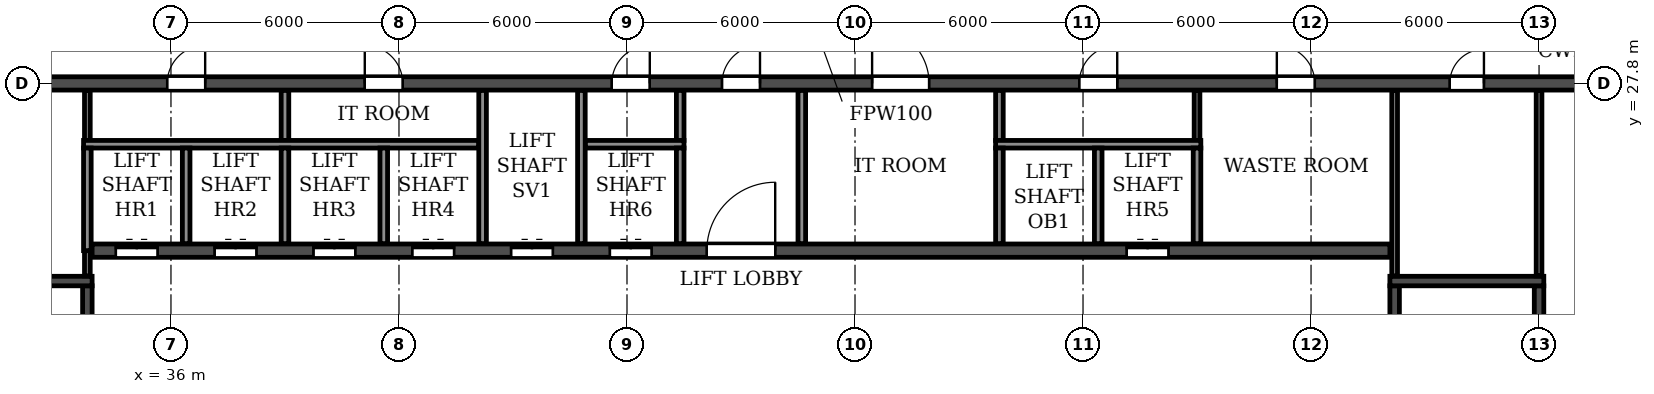
"""IFC4 building model, lengths in metres.
Left out: names, types, materials, properties, quantities, classifications, styles, units other than length and angle.
Written with IfcOpenShell. Run it as: python <this file> out.ifc"""

import sys

from ifc_helpers import new_model, si_unit, direction, frame, frame_2d, origin, place, context, subcontext, project, spatial, rectangle, extrude, element, fill, save


model = new_model("IFC4")
c1 = context("Model", 3, precision=1e-05, world=origin(), true_north=direction((0.0, 1.0)))
c2 = subcontext(c1, "Body", "Model", "MODEL_VIEW")
j1 = project(units=[si_unit("LENGTHUNIT", "METRE"), si_unit("PLANEANGLEUNIT", "RADIAN")], contexts=[c1])
p1 = place(None, origin())
s1 = spatial("IfcSite", under=j1, at=p1, CompositionType="ELEMENT")
p2 = place(p1, origin())
s2 = spatial("IfcBuilding", under=s1, at=p2, CompositionType="ELEMENT")
p3 = place(p2, frame((0.0, 0.0, 221.4)))
s3 = spatial("IfcBuildingStorey", under=s2, at=p3, CompositionType="ELEMENT", Elevation=221.4)
p4 = place(p3, frame((18.2, 27.8, 0.0), z_axis=(0.0, 0.0, 1.0), x_axis=(1.0, 0.0, 0.0)))
e1 = element("IfcWall", 1, at=p4, inside=s3, PredefinedType="SOLIDWALL", context=c2, shape_type="SweptSolid", body=[
    extrude(rectangle(XDim=65.6, YDim=0.35, at=frame_2d((32.8, 0.0))), origin(), (0.0, 0.0, 1.0), 3.08),
])
p5 = place(p4, frame((0.7, 0.0, 0.0)))
e2 = element("IfcOpeningElement", 2, at=p5, cuts=e1, PredefinedType="OPENING", context=c2, shape_type="SweptSolid", body=[
    extrude(rectangle(XDim=1.0, YDim=2.1, at=frame_2d((0.5, 1.05))), frame((0.0, 0.185, 0.0), z_axis=(0.0, -1.0, 0.0), x_axis=(1.0, 0.0, 0.0)), (0.0, 0.0, 1.0), 0.37),
])
p6 = place(p4, frame((4.05, 0.0, 0.0)))
e3 = element("IfcOpeningElement", 3, at=p6, cuts=e1, PredefinedType="OPENING", context=c2, shape_type="SweptSolid", body=[
    extrude(rectangle(XDim=0.9, YDim=2.1, at=frame_2d((0.45, 1.05))), frame((0.0, 0.185, 0.0), z_axis=(0.0, -1.0, 0.0), x_axis=(1.0, 0.0, 0.0)), (0.0, 0.0, 1.0), 0.37),
])
p7 = place(p4, frame((13.25, 0.0, 0.0)))
e4 = element("IfcOpeningElement", 4, at=p7, cuts=e1, PredefinedType="OPENING", context=c2, shape_type="SweptSolid", body=[
    extrude(rectangle(XDim=0.9, YDim=2.1, at=frame_2d((0.45, 1.05))), frame((0.0, 0.185, 0.0), z_axis=(0.0, -1.0, 0.0), x_axis=(1.0, 0.0, 0.0)), (0.0, 0.0, 1.0), 0.37),
])
p8 = place(p4, frame((17.7, 0.0, 0.0)))
e5 = element("IfcOpeningElement", 5, at=p8, cuts=e1, PredefinedType="OPENING", context=c2, shape_type="SweptSolid", body=[
    extrude(rectangle(XDim=1.0, YDim=2.1, at=frame_2d((0.5, 1.05))), frame((0.0, 0.185, 0.0), z_axis=(0.0, -1.0, 0.0), x_axis=(1.0, 0.0, 0.0)), (0.0, 0.0, 1.0), 0.37),
])
p9 = place(p4, frame((22.9, 0.0, 0.0)))
e6 = element("IfcOpeningElement", 6, at=p9, cuts=e1, PredefinedType="OPENING", context=c2, shape_type="SweptSolid", body=[
    extrude(rectangle(XDim=1.0, YDim=2.1, at=frame_2d((0.5, 1.05))), frame((0.0, 0.185, 0.0), z_axis=(0.0, -1.0, 0.0), x_axis=(1.0, 0.0, 0.0)), (0.0, 0.0, 1.0), 0.37),
])
p10 = place(p4, frame((29.4, 0.0, 0.0)))
e7 = element("IfcOpeningElement", 7, at=p10, cuts=e1, PredefinedType="OPENING", context=c2, shape_type="SweptSolid", body=[
    extrude(rectangle(XDim=1.0, YDim=2.1, at=frame_2d((0.5, 1.05))), frame((0.0, 0.185, 0.0), z_axis=(0.0, -1.0, 0.0), x_axis=(1.0, 0.0, 0.0)), (0.0, 0.0, 1.0), 0.37),
])
p11 = place(p4, frame((32.3, 0.0, 0.0)))
e8 = element("IfcOpeningElement", 8, at=p11, cuts=e1, PredefinedType="OPENING", context=c2, shape_type="SweptSolid", body=[
    extrude(rectangle(XDim=1.0, YDim=2.1, at=frame_2d((0.5, 1.05))), frame((0.0, 0.185, 0.0), z_axis=(0.0, -1.0, 0.0), x_axis=(1.0, 0.0, 0.0)), (0.0, 0.0, 1.0), 0.37),
])
p12 = place(p4, frame((36.25, 0.0, 0.0)))
e9 = element("IfcOpeningElement", 9, at=p12, cuts=e1, PredefinedType="OPENING", context=c2, shape_type="SweptSolid", body=[
    extrude(rectangle(XDim=1.5, YDim=2.1, at=frame_2d((0.75, 1.05))), frame((0.0, 0.185, 0.0), z_axis=(0.0, -1.0, 0.0), x_axis=(1.0, 0.0, 0.0)), (0.0, 0.0, 1.0), 0.37),
])
p13 = place(p4, frame((41.7, 0.0, 0.0)))
e10 = element("IfcOpeningElement", 10, at=p13, cuts=e1, PredefinedType="OPENING", context=c2, shape_type="SweptSolid", body=[
    extrude(rectangle(XDim=1.0, YDim=2.1, at=frame_2d((0.5, 1.05))), frame((0.0, 0.185, 0.0), z_axis=(0.0, -1.0, 0.0), x_axis=(1.0, 0.0, 0.0)), (0.0, 0.0, 1.0), 0.37),
])
p14 = place(p4, frame((46.9, 0.0, 0.0)))
e11 = element("IfcOpeningElement", 11, at=p14, cuts=e1, PredefinedType="OPENING", context=c2, shape_type="SweptSolid", body=[
    extrude(rectangle(XDim=1.0, YDim=2.1, at=frame_2d((0.5, 1.05))), frame((0.0, 0.185, 0.0), z_axis=(0.0, -1.0, 0.0), x_axis=(1.0, 0.0, 0.0)), (0.0, 0.0, 1.0), 0.37),
])
p15 = place(p4, frame((51.45, 0.0, 0.0)))
e12 = element("IfcOpeningElement", 12, at=p15, cuts=e1, PredefinedType="OPENING", context=c2, shape_type="SweptSolid", body=[
    extrude(rectangle(XDim=0.9, YDim=2.1, at=frame_2d((0.45, 1.05))), frame((0.0, 0.185, 0.0), z_axis=(0.0, -1.0, 0.0), x_axis=(1.0, 0.0, 0.0)), (0.0, 0.0, 1.0), 0.37),
])
p16 = place(p4, frame((60.65, 0.0, 0.0)))
e13 = element("IfcOpeningElement", 13, at=p16, cuts=e1, PredefinedType="OPENING", context=c2, shape_type="SweptSolid", body=[
    extrude(rectangle(XDim=0.9, YDim=2.1, at=frame_2d((0.45, 1.05))), frame((0.0, 0.185, 0.0), z_axis=(0.0, -1.0, 0.0), x_axis=(1.0, 0.0, 0.0)), (0.0, 0.0, 1.0), 0.37),
])
p17 = place(p4, frame((63.9, 0.0, 0.0)))
e14 = element("IfcOpeningElement", 14, at=p17, cuts=e1, PredefinedType="OPENING", context=c2, shape_type="SweptSolid", body=[
    extrude(rectangle(XDim=1.0, YDim=2.1, at=frame_2d((0.5, 1.05))), frame((0.0, 0.185, 0.0), z_axis=(0.0, -1.0, 0.0), x_axis=(1.0, 0.0, 0.0)), (0.0, 0.0, 1.0), 0.37),
])
p18 = place(p3, frame((33.925, 23.4, 0.0), z_axis=(0.0, 0.0, 1.0), x_axis=(1.0, 0.0, 0.0)))
e15 = element("IfcWall", 15, at=p18, inside=s3, PredefinedType="SOLIDWALL", context=c2, shape_type="SweptSolid", body=[
    extrude(rectangle(XDim=34.15, YDim=0.35, at=frame_2d((17.075, 0.0))), origin(), (0.0, 0.0, 1.0), 3.08),
])
p19 = place(p18, frame((16.175, 0.0, 0.0)))
e16 = element("IfcOpeningElement", 16, at=p19, cuts=e15, PredefinedType="OPENING", context=c2, shape_type="SweptSolid", body=[
    extrude(rectangle(XDim=1.8, YDim=2.1, at=frame_2d((0.9, 1.05))), frame((0.0, 0.185, 0.0), z_axis=(0.0, -1.0, 0.0), x_axis=(1.0, 0.0, 0.0)), (0.0, 0.0, 1.0), 0.37),
])
p20 = place(p18, frame((0.625, 0.0, 0.0)))
e17 = element("IfcOpeningElement", 17, at=p20, cuts=e15, PredefinedType="OPENING", context=c2, shape_type="SweptSolid", body=[
    extrude(rectangle(XDim=1.1, YDim=2.1, at=frame_2d((0.55, 1.05))), frame((0.0, 0.185, 0.0), z_axis=(0.0, -1.0, 0.0), x_axis=(1.0, 0.0, 0.0)), (0.0, 0.0, 1.0), 0.37),
])
p21 = place(p18, frame((3.225, 0.0, 0.0)))
e18 = element("IfcOpeningElement", 18, at=p21, cuts=e15, PredefinedType="OPENING", context=c2, shape_type="SweptSolid", body=[
    extrude(rectangle(XDim=1.1, YDim=2.1, at=frame_2d((0.55, 1.05))), frame((0.0, 0.185, 0.0), z_axis=(0.0, -1.0, 0.0), x_axis=(1.0, 0.0, 0.0)), (0.0, 0.0, 1.0), 0.37),
])
p22 = place(p18, frame((5.825, 0.0, 0.0)))
e19 = element("IfcOpeningElement", 19, at=p22, cuts=e15, PredefinedType="OPENING", context=c2, shape_type="SweptSolid", body=[
    extrude(rectangle(XDim=1.1, YDim=2.1, at=frame_2d((0.55, 1.05))), frame((0.0, 0.185, 0.0), z_axis=(0.0, -1.0, 0.0), x_axis=(1.0, 0.0, 0.0)), (0.0, 0.0, 1.0), 0.37),
])
p23 = place(p18, frame((8.425, 0.0, 0.0)))
e20 = element("IfcOpeningElement", 20, at=p23, cuts=e15, PredefinedType="OPENING", context=c2, shape_type="SweptSolid", body=[
    extrude(rectangle(XDim=1.1, YDim=2.1, at=frame_2d((0.55, 1.05))), frame((0.0, 0.185, 0.0), z_axis=(0.0, -1.0, 0.0), x_axis=(1.0, 0.0, 0.0)), (0.0, 0.0, 1.0), 0.37),
])
p24 = place(p18, frame((11.025, 0.0, 0.0)))
e21 = element("IfcOpeningElement", 21, at=p24, cuts=e15, PredefinedType="OPENING", context=c2, shape_type="SweptSolid", body=[
    extrude(rectangle(XDim=1.1, YDim=2.1, at=frame_2d((0.55, 1.05))), frame((0.0, 0.185, 0.0), z_axis=(0.0, -1.0, 0.0), x_axis=(1.0, 0.0, 0.0)), (0.0, 0.0, 1.0), 0.37),
])
p25 = place(p18, frame((13.625, 0.0, 0.0)))
e22 = element("IfcOpeningElement", 22, at=p25, cuts=e15, PredefinedType="OPENING", context=c2, shape_type="SweptSolid", body=[
    extrude(rectangle(XDim=1.1, YDim=2.1, at=frame_2d((0.55, 1.05))), frame((0.0, 0.185, 0.0), z_axis=(0.0, -1.0, 0.0), x_axis=(1.0, 0.0, 0.0)), (0.0, 0.0, 1.0), 0.37),
])
p26 = place(p18, frame((27.225, 0.0, 0.0)))
e23 = element("IfcOpeningElement", 23, at=p26, cuts=e15, PredefinedType="OPENING", context=c2, shape_type="SweptSolid", body=[
    extrude(rectangle(XDim=1.1, YDim=2.1, at=frame_2d((0.55, 1.05))), frame((0.0, 0.185, 0.0), z_axis=(0.0, -1.0, 0.0), x_axis=(1.0, 0.0, 0.0)), (0.0, 0.0, 1.0), 0.37),
])
p27 = place(p3, frame((33.8, 14.775, 0.0), z_axis=(0.0, 0.0, 1.0), x_axis=(0.0, 1.0, 0.0)))
e24 = element("IfcWall", 24, at=p27, inside=s3, PredefinedType="SOLIDWALL", context=c2, shape_type="SweptSolid", body=[
    extrude(rectangle(XDim=7.7, YDim=0.25, at=frame_2d((3.85, 0.0))), origin(), (0.0, 0.0, 1.0), 3.08),
])
p28 = place(p27, frame((0.525, 0.0, 0.0)))
e25 = element("IfcOpeningElement", 25, at=p28, cuts=e24, PredefinedType="OPENING", context=c2, shape_type="SweptSolid", body=[
    extrude(rectangle(XDim=1.0, YDim=2.1, at=frame_2d((0.5, 1.05))), frame((0.0, 0.135, 0.0), z_axis=(0.0, -1.0, 0.0), x_axis=(1.0, 0.0, 0.0)), (0.0, 0.0, 1.0), 0.27),
])
p29 = place(p3, frame((29.875, 22.6, 0.0), z_axis=(0.0, 0.0, 1.0), x_axis=(1.0, 0.0, 0.0)))
e26 = element("IfcWall", 26, at=p29, inside=s3, PredefinedType="SOLIDWALL", context=c2, shape_type="SweptSolid", body=[
    extrude(rectangle(XDim=4.05, YDim=0.25, at=frame_2d((2.025, 0.0))), origin(), (0.0, 0.0, 1.0), 3.08),
])
p30 = place(p3, frame((68.2, 14.775, 0.0), z_axis=(0.0, 0.0, 1.0), x_axis=(0.0, 1.0, 0.0)))
e27 = element("IfcWall", 27, at=p30, inside=s3, PredefinedType="SOLIDWALL", context=c2, shape_type="SweptSolid", body=[
    extrude(rectangle(XDim=7.7, YDim=0.25, at=frame_2d((3.85, 0.0))), origin(), (0.0, 0.0, 1.0), 3.08),
])
p31 = place(p30, frame((0.525, 0.0, 0.0)))
e28 = element("IfcOpeningElement", 28, at=p31, cuts=e27, PredefinedType="OPENING", context=c2, shape_type="SweptSolid", body=[
    extrude(rectangle(XDim=1.0, YDim=2.1, at=frame_2d((0.5, 1.05))), frame((0.0, 0.135, 0.0), z_axis=(0.0, -1.0, 0.0), x_axis=(1.0, 0.0, 0.0)), (0.0, 0.0, 1.0), 0.27),
])
p32 = place(p3, frame((72.0, 14.775, 0.0), z_axis=(0.0, 0.0, 1.0), x_axis=(0.0, 1.0, 0.0)))
e29 = element("IfcWall", 29, at=p32, inside=s3, PredefinedType="SOLIDWALL", context=c2, shape_type="SweptSolid", body=[
    extrude(rectangle(XDim=7.7, YDim=0.25, at=frame_2d((3.85, 0.0))), origin(), (0.0, 0.0, 1.0), 3.08),
])
p33 = place(p3, frame((68.075, 22.6, 0.0), z_axis=(0.0, 0.0, 1.0), x_axis=(1.0, 0.0, 0.0)))
e30 = element("IfcWall", 30, at=p33, inside=s3, PredefinedType="SOLIDWALL", context=c2, shape_type="SweptSolid", body=[
    extrude(rectangle(XDim=4.05, YDim=0.25, at=frame_2d((2.025, 0.0))), origin(), (0.0, 0.0, 1.0), 3.08),
])
p34 = place(p3, frame((63.0, 26.3, 0.0), z_axis=(0.0, 0.0, 1.0), x_axis=(0.0, 1.0, 0.0)))
e31 = element("IfcWall", 31, at=p34, inside=s3, PredefinedType="PARTITIONING", context=c2, shape_type="SweptSolid", body=[
    extrude(rectangle(XDim=1.315, YDim=0.15, at=frame_2d((0.657, 0.0))), origin(), (0.0, 0.0, 1.0), 3.08),
])
for number, where, z_axis, x_axis in (
    (32, (39.0, 26.3, 0.0), (0.0, 0.0, 1.0), (0.0, 1.0, 0.0)),
    (33, (49.4, 26.3, 0.0), (0.0, 0.0, 1.0), (0.0, 1.0, 0.0)),
):
    element("IfcWall", number, at=place(p3, frame(where, z_axis=z_axis, x_axis=x_axis)), inside=s3, PredefinedType="PARTITIONING", context=c2, shape_type="SweptSolid", body=[
        extrude(rectangle(XDim=1.315, YDim=0.2, at=frame_2d((0.657, 0.0))), origin(), (0.0, 0.0, 1.0), 3.08),
    ])
p35 = place(p3, frame((52.6, 23.585, 0.0), z_axis=(0.0, 0.0, 1.0), x_axis=(0.0, 1.0, 0.0)))
e34 = element("IfcWall", 34, at=p35, inside=s3, PredefinedType="PARTITIONING", context=c2, shape_type="SweptSolid", body=[
    extrude(rectangle(XDim=4.03, YDim=0.2, at=frame_2d((2.015, 0.0))), origin(), (0.0, 0.0, 1.0), 3.08),
])
p36 = place(p3, frame((57.8, 26.3, 0.0), z_axis=(0.0, 0.0, 1.0), x_axis=(0.0, 1.0, 0.0)))
e35 = element("IfcWall", 35, at=p36, inside=s3, PredefinedType="PARTITIONING", context=c2, shape_type="SweptSolid", body=[
    extrude(rectangle(XDim=1.315, YDim=0.2, at=frame_2d((0.657, 0.0))), origin(), (0.0, 0.0, 1.0), 3.08),
])
p37 = place(p3, frame((33.8, 22.735, 0.0), z_axis=(0.0, 0.0, 1.0), x_axis=(0.0, 1.0, 0.0)))
e36 = element("IfcWall", 36, at=p37, inside=s3, PredefinedType="PARTITIONING", context=c2, shape_type="SweptSolid", body=[
    extrude(rectangle(XDim=0.665, YDim=0.15, at=frame_2d((0.333, 0.0))), origin(), (0.0, 0.0, 1.0), 3.08),
])
p38 = place(p3, frame((33.8, 26.3, 0.0), z_axis=(0.0, 0.0, 1.0), x_axis=(0.0, 1.0, 0.0)))
e37 = element("IfcWall", 37, at=p38, inside=s3, PredefinedType="PARTITIONING", context=c2, shape_type="SweptSolid", body=[
    extrude(rectangle(XDim=1.315, YDim=0.15, at=frame_2d((0.657, 0.0))), origin(), (0.0, 0.0, 1.0), 3.08),
])
for number, where, z_axis, x_axis in (
    (38, (68.2, 22.735, 0.0), (0.0, 0.0, 1.0), (0.0, 1.0, 0.0)),
    (39, (72.0, 22.735, 0.0), (0.0, 0.0, 1.0), (0.0, 1.0, 0.0)),
):
    element("IfcWall", number, at=place(p3, frame(where, z_axis=z_axis, x_axis=x_axis)), inside=s3, PredefinedType="PARTITIONING", context=c2, shape_type="SweptSolid", body=[
        extrude(rectangle(XDim=4.88, YDim=0.15, at=frame_2d((2.44, 0.0))), origin(), (0.0, 0.0, 1.0), 3.08),
    ])
p39 = place(p3, frame((33.7, 26.2, 0.0), z_axis=(0.0, 0.0, 1.0), x_axis=(1.0, 0.0, 0.0)))
e40 = element("IfcWall", 40, at=p39, inside=s3, PredefinedType="PARTITIONING", context=c2, shape_type="SweptSolid", body=[
    extrude(rectangle(XDim=10.4, YDim=0.2, at=frame_2d((5.2, 0.0))), origin(), (0.0, 0.0, 1.0), 3.08),
])
p40 = place(p3, frame((46.9, 26.2, 0.0), z_axis=(0.0, 0.0, 1.0), x_axis=(1.0, 0.0, 0.0)))
e41 = element("IfcWall", 41, at=p40, inside=s3, PredefinedType="PARTITIONING", context=c2, shape_type="SweptSolid", body=[
    extrude(rectangle(XDim=2.6, YDim=0.2, at=frame_2d((1.3, 0.0))), origin(), (0.0, 0.0, 1.0), 3.08),
])
p41 = place(p3, frame((57.7, 26.2, 0.0), z_axis=(0.0, 0.0, 1.0), x_axis=(1.0, 0.0, 0.0)))
e42 = element("IfcWall", 42, at=p41, inside=s3, PredefinedType="PARTITIONING", context=c2, shape_type="SweptSolid", body=[
    extrude(rectangle(XDim=5.4, YDim=0.2, at=frame_2d((2.7, 0.0))), origin(), (0.0, 0.0, 1.0), 3.08),
])
p42 = place(p3, frame((33.8, 23.4, 0.0), z_axis=(0.0, 0.0, 1.0), x_axis=(0.0, 1.0, 0.0)))
e43 = element("IfcWall", 43, at=p42, inside=s3, PredefinedType="PARTITIONING", context=c2, shape_type="SweptSolid", body=[
    extrude(rectangle(XDim=2.7, YDim=0.2, at=frame_2d((1.35, 0.0))), origin(), (0.0, 0.0, 1.0), 3.08),
])
for number, where, z_axis, x_axis in (
    (44, (36.4, 23.585, 0.0), (0.0, 0.0, 1.0), (0.0, 1.0, 0.0)),
    (45, (39.0, 23.585, 0.0), (0.0, 0.0, 1.0), (0.0, 1.0, 0.0)),
    (46, (41.6, 23.585, 0.0), (0.0, 0.0, 1.0), (0.0, 1.0, 0.0)),
):
    element("IfcWall", number, at=place(p3, frame(where, z_axis=z_axis, x_axis=x_axis)), inside=s3, PredefinedType="PARTITIONING", context=c2, shape_type="SweptSolid", body=[
        extrude(rectangle(XDim=2.515, YDim=0.2, at=frame_2d((1.258, 0.0))), origin(), (0.0, 0.0, 1.0), 3.08),
    ])
for number, where, z_axis, x_axis in (
    (47, (44.2, 23.585, 0.0), (0.0, 0.0, 1.0), (0.0, 1.0, 0.0)),
    (48, (46.8, 23.585, 0.0), (0.0, 0.0, 1.0), (0.0, 1.0, 0.0)),
):
    element("IfcWall", number, at=place(p3, frame(where, z_axis=z_axis, x_axis=x_axis)), inside=s3, PredefinedType="PARTITIONING", context=c2, shape_type="SweptSolid", body=[
        extrude(rectangle(XDim=4.03, YDim=0.2, at=frame_2d((2.015, 0.0))), origin(), (0.0, 0.0, 1.0), 3.08),
    ])
for number, where, z_axis, x_axis in (
    (49, (49.4, 23.585, 0.0), (0.0, 0.0, 1.0), (0.0, 1.0, 0.0)),
    (50, (57.8, 23.585, 0.0), (0.0, 0.0, 1.0), (0.0, 1.0, 0.0)),
    (51, (60.4, 23.585, 0.0), (0.0, 0.0, 1.0), (0.0, 1.0, 0.0)),
    (52, (63.0, 23.585, 0.0), (0.0, 0.0, 1.0), (0.0, 1.0, 0.0)),
):
    element("IfcWall", number, at=place(p3, frame(where, z_axis=z_axis, x_axis=x_axis)), inside=s3, PredefinedType="PARTITIONING", context=c2, shape_type="SweptSolid", body=[
        extrude(rectangle(XDim=2.515, YDim=0.2, at=frame_2d((1.258, 0.0))), origin(), (0.0, 0.0, 1.0), 3.08),
    ])
p43 = place(p8, origin())
e53 = element("IfcDoor", 53, at=p43, inside=s3, OperationType="SINGLE_SWING_RIGHT", PredefinedType="DOOR", context=c2, shape_type="SweptSolid", body=[
    extrude(rectangle(XDim=1.0, YDim=2.1, at=frame_2d((0.5, 1.05))), frame((0.0, 0.025, 0.0), z_axis=(0.0, -1.0, 0.0), x_axis=(1.0, 0.0, 0.0)), (0.0, 0.0, 1.0), 0.05),
])
fill(e5, e53)
p44 = place(p9, origin())
e54 = element("IfcDoor", 54, at=p44, inside=s3, OperationType="SINGLE_SWING_LEFT", PredefinedType="DOOR", context=c2, shape_type="SweptSolid", body=[
    extrude(rectangle(XDim=1.0, YDim=2.1, at=frame_2d((0.5, 1.05))), frame((0.0, 0.025, 0.0), z_axis=(0.0, -1.0, 0.0), x_axis=(1.0, 0.0, 0.0)), (0.0, 0.0, 1.0), 0.05),
])
fill(e6, e54)
p45 = place(p10, origin())
e55 = element("IfcDoor", 55, at=p45, inside=s3, OperationType="SINGLE_SWING_RIGHT", PredefinedType="DOOR", context=c2, shape_type="SweptSolid", body=[
    extrude(rectangle(XDim=1.0, YDim=2.1, at=frame_2d((0.5, 1.05))), frame((0.0, 0.025, 0.0), z_axis=(0.0, -1.0, 0.0), x_axis=(1.0, 0.0, 0.0)), (0.0, 0.0, 1.0), 0.05),
])
fill(e7, e55)
p46 = place(p11, origin())
e56 = element("IfcDoor", 56, at=p46, inside=s3, OperationType="SINGLE_SWING_RIGHT", PredefinedType="DOOR", context=c2, shape_type="SweptSolid", body=[
    extrude(rectangle(XDim=1.0, YDim=2.1, at=frame_2d((0.5, 1.05))), frame((0.0, 0.025, 0.0), z_axis=(0.0, -1.0, 0.0), x_axis=(1.0, 0.0, 0.0)), (0.0, 0.0, 1.0), 0.05),
])
fill(e8, e56)
p47 = place(p12, origin())
e57 = element("IfcDoor", 57, at=p47, inside=s3, OperationType="DOUBLE_DOOR_SINGLE_SWING", PredefinedType="DOOR", context=c2, shape_type="SweptSolid", body=[
    extrude(rectangle(XDim=1.5, YDim=2.1, at=frame_2d((0.75, 1.05))), frame((0.0, 0.025, 0.0), z_axis=(0.0, -1.0, 0.0), x_axis=(1.0, 0.0, 0.0)), (0.0, 0.0, 1.0), 0.05),
])
fill(e9, e57)
p48 = place(p13, origin())
e58 = element("IfcDoor", 58, at=p48, inside=s3, OperationType="SINGLE_SWING_RIGHT", PredefinedType="DOOR", context=c2, shape_type="SweptSolid", body=[
    extrude(rectangle(XDim=1.0, YDim=2.1, at=frame_2d((0.5, 1.05))), frame((0.0, 0.025, 0.0), z_axis=(0.0, -1.0, 0.0), x_axis=(1.0, 0.0, 0.0)), (0.0, 0.0, 1.0), 0.05),
])
fill(e10, e58)
p49 = place(p14, origin())
e59 = element("IfcDoor", 59, at=p49, inside=s3, OperationType="SINGLE_SWING_LEFT", PredefinedType="DOOR", context=c2, shape_type="SweptSolid", body=[
    extrude(rectangle(XDim=1.0, YDim=2.1, at=frame_2d((0.5, 1.05))), frame((0.0, 0.025, 0.0), z_axis=(0.0, -1.0, 0.0), x_axis=(1.0, 0.0, 0.0)), (0.0, 0.0, 1.0), 0.05),
])
fill(e11, e59)
p50 = place(p15, origin())
e60 = element("IfcDoor", 60, at=p50, inside=s3, OperationType="SINGLE_SWING_RIGHT", PredefinedType="DOOR", context=c2, shape_type="SweptSolid", body=[
    extrude(rectangle(XDim=0.9, YDim=2.1, at=frame_2d((0.45, 1.05))), frame((0.0, 0.025, 0.0), z_axis=(0.0, -1.0, 0.0), x_axis=(1.0, 0.0, 0.0)), (0.0, 0.0, 1.0), 0.05),
])
fill(e12, e60)
p51 = place(p19, origin())
e61 = element("IfcDoor", 61, at=p51, inside=s3, OperationType="DOUBLE_DOOR_SINGLE_SWING", PredefinedType="DOOR", context=c2, shape_type="SweptSolid", body=[
    extrude(rectangle(XDim=1.8, YDim=2.1, at=frame_2d((0.9, 1.05))), frame((0.0, 0.025, 0.0), z_axis=(0.0, -1.0, 0.0), x_axis=(1.0, 0.0, 0.0)), (0.0, 0.0, 1.0), 0.05),
])
fill(e16, e61)
p52 = place(p20, origin())
e62 = element("IfcDoor", 62, at=p52, inside=s3, OperationType="DOUBLE_DOOR_SLIDING", PredefinedType="DOOR", context=c2, shape_type="SweptSolid", body=[
    extrude(rectangle(XDim=1.1, YDim=2.1, at=frame_2d((0.55, 1.05))), frame((0.0, 0.025, 0.0), z_axis=(0.0, -1.0, 0.0), x_axis=(1.0, 0.0, 0.0)), (0.0, 0.0, 1.0), 0.05),
])
fill(e17, e62)
p53 = place(p21, origin())
e63 = element("IfcDoor", 63, at=p53, inside=s3, OperationType="DOUBLE_DOOR_SLIDING", PredefinedType="DOOR", context=c2, shape_type="SweptSolid", body=[
    extrude(rectangle(XDim=1.1, YDim=2.1, at=frame_2d((0.55, 1.05))), frame((0.0, 0.025, 0.0), z_axis=(0.0, -1.0, 0.0), x_axis=(1.0, 0.0, 0.0)), (0.0, 0.0, 1.0), 0.05),
])
fill(e18, e63)
p54 = place(p22, origin())
e64 = element("IfcDoor", 64, at=p54, inside=s3, OperationType="DOUBLE_DOOR_SLIDING", PredefinedType="DOOR", context=c2, shape_type="SweptSolid", body=[
    extrude(rectangle(XDim=1.1, YDim=2.1, at=frame_2d((0.55, 1.05))), frame((0.0, 0.025, 0.0), z_axis=(0.0, -1.0, 0.0), x_axis=(1.0, 0.0, 0.0)), (0.0, 0.0, 1.0), 0.05),
])
fill(e19, e64)
p55 = place(p23, origin())
e65 = element("IfcDoor", 65, at=p55, inside=s3, OperationType="DOUBLE_DOOR_SLIDING", PredefinedType="DOOR", context=c2, shape_type="SweptSolid", body=[
    extrude(rectangle(XDim=1.1, YDim=2.1, at=frame_2d((0.55, 1.05))), frame((0.0, 0.025, 0.0), z_axis=(0.0, -1.0, 0.0), x_axis=(1.0, 0.0, 0.0)), (0.0, 0.0, 1.0), 0.05),
])
fill(e20, e65)
p56 = place(p24, origin())
e66 = element("IfcDoor", 66, at=p56, inside=s3, OperationType="DOUBLE_DOOR_SLIDING", PredefinedType="DOOR", context=c2, shape_type="SweptSolid", body=[
    extrude(rectangle(XDim=1.1, YDim=2.1, at=frame_2d((0.55, 1.05))), frame((0.0, 0.025, 0.0), z_axis=(0.0, -1.0, 0.0), x_axis=(1.0, 0.0, 0.0)), (0.0, 0.0, 1.0), 0.05),
])
fill(e21, e66)
p57 = place(p25, origin())
e67 = element("IfcDoor", 67, at=p57, inside=s3, OperationType="DOUBLE_DOOR_SLIDING", PredefinedType="DOOR", context=c2, shape_type="SweptSolid", body=[
    extrude(rectangle(XDim=1.1, YDim=2.1, at=frame_2d((0.55, 1.05))), frame((0.0, 0.025, 0.0), z_axis=(0.0, -1.0, 0.0), x_axis=(1.0, 0.0, 0.0)), (0.0, 0.0, 1.0), 0.05),
])
fill(e22, e67)
p58 = place(p26, origin())
e68 = element("IfcDoor", 68, at=p58, inside=s3, OperationType="DOUBLE_DOOR_SLIDING", PredefinedType="DOOR", context=c2, shape_type="SweptSolid", body=[
    extrude(rectangle(XDim=1.1, YDim=2.1, at=frame_2d((0.55, 1.05))), frame((0.0, 0.025, 0.0), z_axis=(0.0, -1.0, 0.0), x_axis=(1.0, 0.0, 0.0)), (0.0, 0.0, 1.0), 0.05),
])
fill(e23, e68)
save(model, sys.argv[1])
